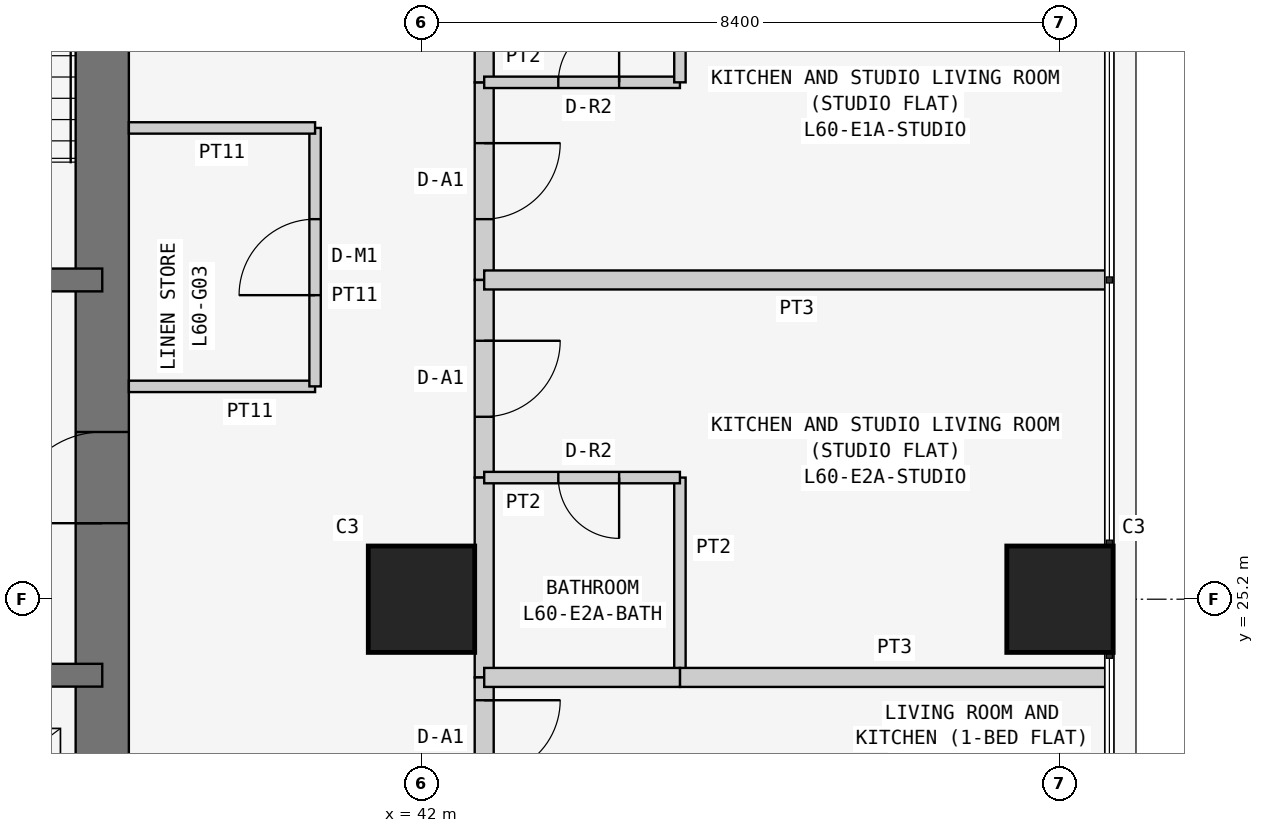
"""IFC4 building model, lengths in metres.
Left out: names, types, materials, properties, quantities, classifications, styles, units other than length and angle.
Written with IfcOpenShell. Run it as: python <this file> out.ifc"""

import sys

from ifc_helpers import new_model, si_unit, direction, frame, frame_2d, origin, origin_2d, place, context, subcontext, project, spatial, rectangle, extrude, element, fill, save


model = new_model("IFC4")
c1 = context("Model", 3, precision=1e-05, world=origin(), true_north=direction((0.0, 1.0)))
c2 = subcontext(c1, "Body", "Model", "MODEL_VIEW")
j1 = project(units=[si_unit("LENGTHUNIT", "METRE"), si_unit("PLANEANGLEUNIT", "RADIAN")], contexts=[c1])
p1 = place(None, origin())
s1 = spatial("IfcSite", under=j1, at=p1, CompositionType="ELEMENT")
p2 = place(p1, origin())
s2 = spatial("IfcBuilding", under=s1, at=p2, CompositionType="ELEMENT")
p3 = place(p2, frame((0.0, 0.0, 230.1)))
s3 = spatial("IfcBuildingStorey", under=s2, at=p3, CompositionType="ELEMENT", Elevation=230.1)
for number, where, z_axis, x_axis in (
    (1, (42.0, 25.2, 0.0), (0.0, 0.0, 1.0), (1.0, 0.0, 0.0)),
    (2, (50.4, 25.2, 0.0), (0.0, 0.0, 1.0), (1.0, 0.0, 0.0)),
):
    element("IfcColumn", number, at=place(p3, frame(where, z_axis=z_axis, x_axis=x_axis)), inside=s3, PredefinedType="COLUMN", context=c2, shape_type="SweptSolid", body=[
        extrude(rectangle(XDim=1.4, YDim=1.4, at=origin_2d()), origin(), (0.0, 0.0, 1.0), 3.6),
    ])
p4 = place(p3, frame((37.8, 21.0, 0.0), z_axis=(0.0, 0.0, 1.0), x_axis=(0.0, 1.0, 0.0)))
e3 = element("IfcWall", 3, at=p4, inside=s3, PredefinedType="SHEAR", context=c2, shape_type="SweptSolid", body=[
    extrude(rectangle(XDim=17.15, YDim=0.7, at=frame_2d((8.575, 0.0))), origin(), (0.0, 0.0, 1.0), 3.6),
])
p5 = place(p4, frame((5.2, 0.0, 0.0)))
e4 = element("IfcOpeningElement", 4, at=p5, cuts=e3, PredefinedType="OPENING", context=c2, shape_type="SweptSolid", body=[
    extrude(rectangle(XDim=1.2, YDim=2.1, at=frame_2d((0.6, 1.05))), frame((0.0, 0.36, 0.0), z_axis=(0.0, -1.0, 0.0), x_axis=(1.0, 0.0, 0.0)), (0.0, 0.0, 1.0), 0.72),
])
p6 = place(p3, frame((26.6, 24.2, 0.0), z_axis=(0.0, 0.0, 1.0), x_axis=(1.0, 0.0, 0.0)))
e5 = element("IfcWall", 5, at=p6, inside=s3, PredefinedType="SHEAR", context=c2, shape_type="SweptSolid", body=[
    extrude(rectangle(XDim=11.2, YDim=0.3, at=frame_2d((5.6, 0.0))), origin(), (0.0, 0.0, 1.0), 3.6),
])
p7 = place(p6, frame((0.913, 0.0, 0.0)))
e6 = element("IfcOpeningElement", 6, at=p7, cuts=e5, PredefinedType="OPENING", context=c2, shape_type="SweptSolid", body=[
    extrude(rectangle(XDim=1.0, YDim=2.1, at=frame_2d((0.5, 1.05))), frame((0.0, 0.16, 0.0), z_axis=(0.0, -1.0, 0.0), x_axis=(1.0, 0.0, 0.0)), (0.0, 0.0, 1.0), 0.32),
])
p8 = place(p6, frame((3.75, 0.0, 0.0)))
e7 = element("IfcOpeningElement", 7, at=p8, cuts=e5, PredefinedType="OPENING", context=c2, shape_type="SweptSolid", body=[
    extrude(rectangle(XDim=0.9, YDim=2.1, at=frame_2d((0.45, 1.05))), frame((0.0, 0.16, 0.0), z_axis=(0.0, -1.0, 0.0), x_axis=(1.0, 0.0, 0.0)), (0.0, 0.0, 1.0), 0.32),
])
p9 = place(p6, frame((6.45, 0.0, 0.0)))
e8 = element("IfcOpeningElement", 8, at=p9, cuts=e5, PredefinedType="OPENING", context=c2, shape_type="SweptSolid", body=[
    extrude(rectangle(XDim=1.1, YDim=2.1, at=frame_2d((0.55, 1.05))), frame((0.0, 0.16, 0.0), z_axis=(0.0, -1.0, 0.0), x_axis=(1.0, 0.0, 0.0)), (0.0, 0.0, 1.0), 0.32),
])
p10 = place(p6, frame((9.1, 0.0, 0.0)))
e9 = element("IfcOpeningElement", 9, at=p10, cuts=e5, PredefinedType="OPENING", context=c2, shape_type="SweptSolid", body=[
    extrude(rectangle(XDim=1.1, YDim=2.1, at=frame_2d((0.55, 1.05))), frame((0.0, 0.16, 0.0), z_axis=(0.0, -1.0, 0.0), x_axis=(1.0, 0.0, 0.0)), (0.0, 0.0, 1.0), 0.32),
])
p11 = place(p3, frame((32.2, 29.4, 0.0), z_axis=(0.0, 0.0, 1.0), x_axis=(1.0, 0.0, 0.0)))
e10 = element("IfcWall", 10, at=p11, inside=s3, PredefinedType="SHEAR", context=c2, shape_type="SweptSolid", body=[
    extrude(rectangle(XDim=5.6, YDim=0.3, at=frame_2d((2.8, 0.0))), origin(), (0.0, 0.0, 1.0), 3.6),
])
p12 = place(p11, frame((2.0, 0.0, 0.0)))
e11 = element("IfcOpeningElement", 11, at=p12, cuts=e10, PredefinedType="OPENING", context=c2, shape_type="SweptSolid", body=[
    extrude(rectangle(XDim=1.2, YDim=2.1, at=frame_2d((0.6, 1.05))), frame((0.0, 0.16, 0.0), z_axis=(0.0, -1.0, 0.0), x_axis=(1.0, 0.0, 0.0)), (0.0, 0.0, 1.0), 0.32),
])
p13 = place(p3, frame((38.15, 28.0, 0.0), z_axis=(0.0, 0.0, 1.0), x_axis=(1.0, 0.0, 0.0)))
e12 = element("IfcWall", 12, at=p13, inside=s3, PredefinedType="PARTITIONING", context=c2, shape_type="SweptSolid", body=[
    extrude(rectangle(XDim=2.45, YDim=0.15, at=frame_2d((1.225, 0.0))), origin(), (0.0, 0.0, 1.0), 3.45),
])
p14 = place(p3, frame((40.6, 28.0, 0.0), z_axis=(0.0, 0.0, 1.0), x_axis=(0.0, 1.0, 0.0)))
e13 = element("IfcWall", 13, at=p14, inside=s3, PredefinedType="PARTITIONING", context=c2, shape_type="SweptSolid", body=[
    extrude(rectangle(XDim=3.4, YDim=0.15, at=frame_2d((1.7, 0.0))), origin(), (0.0, 0.0, 1.0), 3.45),
])
p15 = place(p14, frame((1.2, 0.0, 0.0)))
e14 = element("IfcOpeningElement", 14, at=p15, cuts=e13, PredefinedType="OPENING", context=c2, shape_type="SweptSolid", body=[
    extrude(rectangle(XDim=1.0, YDim=2.1, at=frame_2d((0.5, 1.05))), frame((0.0, 0.085, 0.0), z_axis=(0.0, -1.0, 0.0), x_axis=(1.0, 0.0, 0.0)), (0.0, 0.0, 1.0), 0.17),
])
p16 = place(p3, frame((40.6, 31.4, 0.0), z_axis=(0.0, 0.0, 1.0), x_axis=(-1.0, 0.0, 0.0)))
e15 = element("IfcWall", 15, at=p16, inside=s3, PredefinedType="PARTITIONING", context=c2, shape_type="SweptSolid", body=[
    extrude(rectangle(XDim=2.45, YDim=0.15, at=frame_2d((1.225, 0.0))), origin(), (0.0, 0.0, 1.0), 3.45),
])
p17 = place(p3, frame((42.825, 32.0, 0.0), z_axis=(0.0, 0.0, 1.0), x_axis=(0.0, -1.0, 0.0)))
e16 = element("IfcWall", 16, at=p17, inside=s3, PredefinedType="PARTITIONING", context=c2, shape_type="SweptSolid", body=[
    extrude(rectangle(XDim=2.6, YDim=0.25, at=frame_2d((1.3, 0.0))), origin(), (0.0, 0.0, 1.0), 3.45),
])
p18 = place(p17, frame((0.8, 0.0, 0.0)))
e17 = element("IfcOpeningElement", 17, at=p18, cuts=e16, PredefinedType="OPENING", context=c2, shape_type="SweptSolid", body=[
    extrude(rectangle(XDim=1.0, YDim=2.1, at=frame_2d((0.5, 1.05))), frame((0.0, 0.135, 0.0), z_axis=(0.0, -1.0, 0.0), x_axis=(1.0, 0.0, 0.0)), (0.0, 0.0, 1.0), 0.27),
])
p19 = place(p3, frame((42.825, 34.629, 0.0), z_axis=(0.0, 0.0, 1.0), x_axis=(0.0, -1.0, 0.0)))
e18 = element("IfcWall", 18, at=p19, inside=s3, PredefinedType="PARTITIONING", context=c2, shape_type="SweptSolid", body=[
    extrude(rectangle(XDim=2.629, YDim=0.25, at=frame_2d((1.314, 0.0))), origin(), (0.0, 0.0, 1.0), 3.45),
])
p20 = place(p3, frame((42.825, 29.4, 0.0), z_axis=(0.0, 0.0, 1.0), x_axis=(0.0, -1.0, 0.0)))
e19 = element("IfcWall", 19, at=p20, inside=s3, PredefinedType="PARTITIONING", context=c2, shape_type="SweptSolid", body=[
    extrude(rectangle(XDim=2.6, YDim=0.25, at=frame_2d((1.3, 0.0))), origin(), (0.0, 0.0, 1.0), 3.45),
])
p21 = place(p20, frame((0.8, 0.0, 0.0)))
e20 = element("IfcOpeningElement", 20, at=p21, cuts=e19, PredefinedType="OPENING", context=c2, shape_type="SweptSolid", body=[
    extrude(rectangle(XDim=1.0, YDim=2.1, at=frame_2d((0.5, 1.05))), frame((0.0, 0.135, 0.0), z_axis=(0.0, -1.0, 0.0), x_axis=(1.0, 0.0, 0.0)), (0.0, 0.0, 1.0), 0.27),
])
p22 = place(p3, frame((42.825, 26.8, 0.0), z_axis=(0.0, 0.0, 1.0), x_axis=(0.0, -1.0, 0.0)))
e21 = element("IfcWall", 21, at=p22, inside=s3, PredefinedType="PARTITIONING", context=c2, shape_type="SweptSolid", body=[
    extrude(rectangle(XDim=2.629, YDim=0.25, at=frame_2d((1.314, 0.0))), origin(), (0.0, 0.0, 1.0), 3.45),
])
p23 = place(p3, frame((42.825, 24.171, 0.0), z_axis=(0.0, 0.0, 1.0), x_axis=(0.0, -1.0, 0.0)))
e22 = element("IfcWall", 22, at=p23, inside=s3, PredefinedType="PARTITIONING", context=c2, shape_type="SweptSolid", body=[
    extrude(rectangle(XDim=1.6, YDim=0.25, at=frame_2d((0.8, 0.0))), origin(), (0.0, 0.0, 1.0), 3.45),
])
p24 = place(p23, frame((0.3, 0.0, 0.0)))
e23 = element("IfcOpeningElement", 23, at=p24, cuts=e22, PredefinedType="OPENING", context=c2, shape_type="SweptSolid", body=[
    extrude(rectangle(XDim=1.0, YDim=2.1, at=frame_2d((0.5, 1.05))), frame((0.0, 0.135, 0.0), z_axis=(0.0, -1.0, 0.0), x_axis=(1.0, 0.0, 0.0)), (0.0, 0.0, 1.0), 0.27),
])
p25 = place(p3, frame((42.825, 32.0, 0.0), z_axis=(0.0, 0.0, 1.0), x_axis=(1.0, 0.0, 0.0)))
e24 = element("IfcWall", 24, at=p25, inside=s3, PredefinedType="PARTITIONING", context=c2, shape_type="SweptSolid", body=[
    extrude(rectangle(XDim=2.575, YDim=0.15, at=frame_2d((1.288, 0.0))), origin(), (0.0, 0.0, 1.0), 3.45),
])
p26 = place(p25, frame((0.975, 0.0, 0.0)))
e25 = element("IfcOpeningElement", 25, at=p26, cuts=e24, PredefinedType="OPENING", context=c2, shape_type="SweptSolid", body=[
    extrude(rectangle(XDim=0.8, YDim=2.1, at=frame_2d((0.4, 1.05))), frame((0.0, 0.085, 0.0), z_axis=(0.0, -1.0, 0.0), x_axis=(1.0, 0.0, 0.0)), (0.0, 0.0, 1.0), 0.17),
])
p27 = place(p3, frame((45.4, 32.0, 0.0), z_axis=(0.0, 0.0, 1.0), x_axis=(0.0, 1.0, 0.0)))
e26 = element("IfcWall", 26, at=p27, inside=s3, PredefinedType="PARTITIONING", context=c2, shape_type="SweptSolid", body=[
    extrude(rectangle(XDim=2.629, YDim=0.15, at=frame_2d((1.314, 0.0))), origin(), (0.0, 0.0, 1.0), 3.45),
])
p28 = place(p3, frame((51.05, 29.4, 0.0), z_axis=(0.0, 0.0, 1.0), x_axis=(-1.0, 0.0, 0.0)))
e27 = element("IfcWall", 27, at=p28, inside=s3, PredefinedType="PARTITIONING", context=c2, shape_type="SweptSolid", body=[
    extrude(rectangle(XDim=8.225, YDim=0.25, at=frame_2d((4.113, 0.0))), origin(), (0.0, 0.0, 1.0), 3.45),
])
p29 = place(p3, frame((45.4, 24.171, 0.0), z_axis=(0.0, 0.0, 1.0), x_axis=(0.0, 1.0, 0.0)))
e28 = element("IfcWall", 28, at=p29, inside=s3, PredefinedType="PARTITIONING", context=c2, shape_type="SweptSolid", body=[
    extrude(rectangle(XDim=2.629, YDim=0.15, at=frame_2d((1.314, 0.0))), origin(), (0.0, 0.0, 1.0), 3.45),
])
p30 = place(p3, frame((45.4, 26.8, 0.0), z_axis=(0.0, 0.0, 1.0), x_axis=(-1.0, 0.0, 0.0)))
e29 = element("IfcWall", 29, at=p30, inside=s3, PredefinedType="PARTITIONING", context=c2, shape_type="SweptSolid", body=[
    extrude(rectangle(XDim=2.575, YDim=0.15, at=frame_2d((1.288, 0.0))), origin(), (0.0, 0.0, 1.0), 3.45),
])
p31 = place(p30, frame((0.8, 0.0, 0.0)))
e30 = element("IfcOpeningElement", 30, at=p31, cuts=e29, PredefinedType="OPENING", context=c2, shape_type="SweptSolid", body=[
    extrude(rectangle(XDim=0.8, YDim=2.1, at=frame_2d((0.4, 1.05))), frame((0.0, 0.085, 0.0), z_axis=(0.0, -1.0, 0.0), x_axis=(1.0, 0.0, 0.0)), (0.0, 0.0, 1.0), 0.17),
])
p32 = place(p3, frame((51.05, 24.171, 0.0), z_axis=(0.0, 0.0, 1.0), x_axis=(-1.0, 0.0, 0.0)))
e31 = element("IfcWall", 31, at=p32, inside=s3, PredefinedType="PARTITIONING", context=c2, shape_type="SweptSolid", body=[
    extrude(rectangle(XDim=5.65, YDim=0.25, at=frame_2d((2.825, 0.0))), origin(), (0.0, 0.0, 1.0), 3.45),
])
p33 = place(p3, frame((45.4, 24.171, 0.0), z_axis=(0.0, 0.0, 1.0), x_axis=(-1.0, 0.0, 0.0)))
e32 = element("IfcWall", 32, at=p33, inside=s3, PredefinedType="PARTITIONING", context=c2, shape_type="SweptSolid", body=[
    extrude(rectangle(XDim=2.575, YDim=0.25, at=frame_2d((1.288, 0.0))), origin(), (0.0, 0.0, 1.0), 3.45),
])
p34 = place(p15, origin())
e33 = element("IfcDoor", 33, at=p34, inside=s3, OperationType="SINGLE_SWING_LEFT", PredefinedType="DOOR", context=c2, shape_type="SweptSolid", body=[
    extrude(rectangle(XDim=1.0, YDim=2.1, at=frame_2d((0.5, 1.05))), frame((0.0, 0.025, 0.0), z_axis=(0.0, -1.0, 0.0), x_axis=(1.0, 0.0, 0.0)), (0.0, 0.0, 1.0), 0.05),
])
fill(e14, e33)
p35 = place(p18, origin())
e34 = element("IfcDoor", 34, at=p35, inside=s3, OperationType="SINGLE_SWING_LEFT", PredefinedType="DOOR", context=c2, shape_type="SweptSolid", body=[
    extrude(rectangle(XDim=1.0, YDim=2.1, at=frame_2d((0.5, 1.05))), frame((0.0, 0.025, 0.0), z_axis=(0.0, -1.0, 0.0), x_axis=(1.0, 0.0, 0.0)), (0.0, 0.0, 1.0), 0.05),
])
fill(e17, e34)
p36 = place(p26, origin())
e35 = element("IfcDoor", 35, at=p36, inside=s3, OperationType="SINGLE_SWING_RIGHT", PredefinedType="DOOR", context=c2, shape_type="SweptSolid", body=[
    extrude(rectangle(XDim=0.8, YDim=2.1, at=frame_2d((0.4, 1.05))), frame((0.0, 0.025, 0.0), z_axis=(0.0, -1.0, 0.0), x_axis=(1.0, 0.0, 0.0)), (0.0, 0.0, 1.0), 0.05),
])
fill(e25, e35)
p37 = place(p21, origin())
e36 = element("IfcDoor", 36, at=p37, inside=s3, OperationType="SINGLE_SWING_LEFT", PredefinedType="DOOR", context=c2, shape_type="SweptSolid", body=[
    extrude(rectangle(XDim=1.0, YDim=2.1, at=frame_2d((0.5, 1.05))), frame((0.0, 0.025, 0.0), z_axis=(0.0, -1.0, 0.0), x_axis=(1.0, 0.0, 0.0)), (0.0, 0.0, 1.0), 0.05),
])
fill(e20, e36)
p38 = place(p31, origin())
e37 = element("IfcDoor", 37, at=p38, inside=s3, OperationType="SINGLE_SWING_LEFT", PredefinedType="DOOR", context=c2, shape_type="SweptSolid", body=[
    extrude(rectangle(XDim=0.8, YDim=2.1, at=frame_2d((0.4, 1.05))), frame((0.0, 0.025, 0.0), z_axis=(0.0, -1.0, 0.0), x_axis=(1.0, 0.0, 0.0)), (0.0, 0.0, 1.0), 0.05),
])
fill(e30, e37)
p39 = place(p24, origin())
e38 = element("IfcDoor", 38, at=p39, inside=s3, OperationType="SINGLE_SWING_LEFT", PredefinedType="DOOR", context=c2, shape_type="SweptSolid", body=[
    extrude(rectangle(XDim=1.0, YDim=2.1, at=frame_2d((0.5, 1.05))), frame((0.0, 0.025, 0.0), z_axis=(0.0, -1.0, 0.0), x_axis=(1.0, 0.0, 0.0)), (0.0, 0.0, 1.0), 0.05),
])
fill(e23, e38)
p40 = place(p5, origin())
e39 = element("IfcDoor", 39, at=p40, inside=s3, OperationType="SINGLE_SWING_LEFT", PredefinedType="DOOR", context=c2, shape_type="SweptSolid", body=[
    extrude(rectangle(XDim=1.2, YDim=2.1, at=frame_2d((0.6, 1.05))), frame((0.0, 0.025, 0.0), z_axis=(0.0, -1.0, 0.0), x_axis=(1.0, 0.0, 0.0)), (0.0, 0.0, 1.0), 0.05),
])
fill(e4, e39)
save(model, sys.argv[1])
